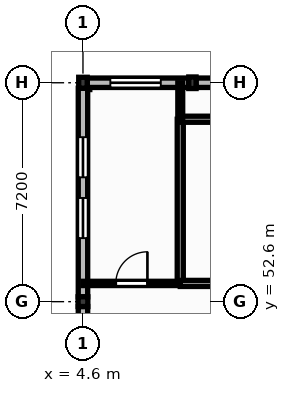
"""IFC4 building model, lengths in metres.
Left out: names, types, materials, properties, quantities, classifications, styles, units other than length and angle.
Written with IfcOpenShell. Run it as: python <this file> out.ifc"""

import sys

from ifc_helpers import new_model, si_unit, direction, frame, frame_2d, origin, origin_2d, place, context, subcontext, project, spatial, rectangle, extrude, element, fill, save


model = new_model("IFC4")
c1 = context("Model", 3, precision=1e-05, world=origin(), true_north=direction((0.0, 1.0)))
c2 = subcontext(c1, "Body", "Model", "MODEL_VIEW")
j1 = project(units=[si_unit("LENGTHUNIT", "METRE"), si_unit("PLANEANGLEUNIT", "RADIAN")], contexts=[c1])
p1 = place(None, origin())
s1 = spatial("IfcSite", under=j1, at=p1, CompositionType="ELEMENT")
p2 = place(p1, origin())
s2 = spatial("IfcBuilding", under=s1, at=p2, CompositionType="ELEMENT")
p3 = place(p2, frame((0.0, 0.0, 9.0)))
s3 = spatial("IfcBuildingStorey", under=s2, at=p3, CompositionType="ELEMENT", Elevation=9.0)
p4 = place(p3, frame((4.6, 52.6, 0.0), z_axis=(0.0, 0.0, 1.0), x_axis=(1.0, 0.0, 0.0)))
e1 = element("IfcColumn", 1, at=p4, inside=s3, PredefinedType="COLUMN", context=c2, shape_type="SweptSolid", body=[
    extrude(rectangle(XDim=0.32, YDim=0.32, at=origin_2d()), origin(), (0.0, 0.0, 1.0), 3.99),
])
p5 = place(p3, frame((4.6, 59.8, 0.0), z_axis=(0.0, 0.0, 1.0), x_axis=(1.0, 0.0, 0.0)))
e2 = element("IfcColumn", 2, at=p5, inside=s3, PredefinedType="COLUMN", context=c2, shape_type="SweptSolid", body=[
    extrude(rectangle(XDim=0.28, YDim=0.36, at=origin_2d()), origin(), (0.0, 0.0, 1.0), 3.99),
])
p6 = place(p3, frame((8.2, 59.8, 0.0), z_axis=(0.0, 0.0, 1.0), x_axis=(1.0, 0.0, 0.0)))
e3 = element("IfcColumn", 3, at=p6, inside=s3, PredefinedType="PILASTER", context=c2, shape_type="SweptSolid", body=[
    extrude(rectangle(XDim=0.24, YDim=0.38, at=origin_2d()), origin(), (0.0, 0.0, 1.0), 3.99),
])
p7 = place(p3, frame((4.6, 45.58, 0.0), z_axis=(0.0, 0.0, 1.0), x_axis=(0.0, 1.0, 0.0)))
e4 = element("IfcWall", 4, at=p7, inside=s3, PredefinedType="SOLIDWALL", context=c2, shape_type="SweptSolid", body=[
    extrude(rectangle(XDim=6.86, YDim=0.31, at=frame_2d((3.43, 0.0))), origin(), (0.0, 0.0, 1.0), 3.53),
])
p8 = place(p7, frame((1.59, 0.0, 1.05)))
e5 = element("IfcOpeningElement", 5, at=p8, cuts=e4, PredefinedType="OPENING", context=c2, shape_type="SweptSolid", body=[
    extrude(rectangle(XDim=1.96, YDim=1.65, at=frame_2d((0.98, 0.825))), frame((0.0, 0.165, 0.0), z_axis=(0.0, -1.0, 0.0), x_axis=(1.0, 0.0, 0.0)), (0.0, 0.0, 1.0), 0.33),
])
p9 = place(p3, frame((4.74, 59.8, 0.0), z_axis=(0.0, 0.0, 1.0), x_axis=(1.0, 0.0, 0.0)))
e6 = element("IfcWall", 6, at=p9, inside=s3, PredefinedType="SOLIDWALL", context=c2, shape_type="SweptSolid", body=[
    extrude(rectangle(XDim=3.34, YDim=0.31, at=frame_2d((1.67, 0.0))), origin(), (0.0, 0.0, 1.0), 3.53),
])
p10 = place(p9, frame((0.76, 0.0, 1.0)))
e7 = element("IfcOpeningElement", 7, at=p10, cuts=e6, PredefinedType="OPENING", context=c2, shape_type="SweptSolid", body=[
    extrude(rectangle(XDim=1.66, YDim=1.8, at=frame_2d((0.83, 0.9))), frame((0.0, 0.165, 0.0), z_axis=(0.0, -1.0, 0.0), x_axis=(1.0, 0.0, 0.0)), (0.0, 0.0, 1.0), 0.33),
])
p11 = place(p3, frame((8.32, 59.8, 0.0), z_axis=(0.0, 0.0, 1.0), x_axis=(1.0, 0.0, 0.0)))
e8 = element("IfcWall", 8, at=p11, inside=s3, PredefinedType="SOLIDWALL", context=c2, shape_type="SweptSolid", body=[
    extrude(rectangle(XDim=3.32, YDim=0.31, at=frame_2d((1.66, 0.0))), origin(), (0.0, 0.0, 1.0), 3.53),
])
p12 = place(p11, frame((1.12, 0.0, 1.0)))
e9 = element("IfcOpeningElement", 9, at=p12, cuts=e8, PredefinedType="OPENING", context=c2, shape_type="SweptSolid", body=[
    extrude(rectangle(XDim=1.08, YDim=1.95, at=frame_2d((0.54, 0.975))), frame((0.0, 0.165, 0.0), z_axis=(0.0, -1.0, 0.0), x_axis=(1.0, 0.0, 0.0)), (0.0, 0.0, 1.0), 0.33),
])
p13 = place(p3, frame((4.6, 52.76, 0.0), z_axis=(0.0, 0.0, 1.0), x_axis=(0.0, 1.0, 0.0)))
e10 = element("IfcWall", 10, at=p13, inside=s3, PredefinedType="SOLIDWALL", context=c2, shape_type="SweptSolid", body=[
    extrude(rectangle(XDim=6.86, YDim=0.31, at=frame_2d((3.43, 0.0))), origin(), (0.0, 0.0, 1.0), 3.53),
])
p14 = place(p13, frame((1.93, 0.0, 1.5)))
e11 = element("IfcOpeningElement", 11, at=p14, cuts=e10, PredefinedType="OPENING", context=c2, shape_type="SweptSolid", body=[
    extrude(rectangle(XDim=1.32, YDim=1.25, at=frame_2d((0.66, 0.625))), frame((0.0, 0.165, 0.0), z_axis=(0.0, -1.0, 0.0), x_axis=(1.0, 0.0, 0.0)), (0.0, 0.0, 1.0), 0.33),
])
p15 = place(p13, frame((3.93, 0.0, 1.5)))
e12 = element("IfcOpeningElement", 12, at=p15, cuts=e10, PredefinedType="OPENING", context=c2, shape_type="SweptSolid", body=[
    extrude(rectangle(XDim=1.32, YDim=1.25, at=frame_2d((0.66, 0.625))), frame((0.0, 0.165, 0.0), z_axis=(0.0, -1.0, 0.0), x_axis=(1.0, 0.0, 0.0)), (0.0, 0.0, 1.0), 0.33),
])
p16 = place(p3, frame((4.6, 53.2, 0.0), z_axis=(0.0, 0.0, 1.0), x_axis=(1.0, 0.0, 0.0)))
e13 = element("IfcWall", 13, at=p16, inside=s3, PredefinedType="PARTITIONING", context=c2, shape_type="SweptSolid", body=[
    extrude(rectangle(XDim=3.2, YDim=0.14, at=frame_2d((1.6, 0.0))), origin(), (0.0, 0.0, 1.0), 3.96),
])
p17 = place(p16, frame((1.08, 0.0, 0.0)))
e14 = element("IfcOpeningElement", 14, at=p17, cuts=e13, PredefinedType="OPENING", context=c2, shape_type="SweptSolid", body=[
    extrude(rectangle(XDim=1.04, YDim=2.1, at=frame_2d((0.52, 1.05))), frame((0.0, 0.08, 0.0), z_axis=(0.0, -1.0, 0.0), x_axis=(1.0, 0.0, 0.0)), (0.0, 0.0, 1.0), 0.16),
])
p18 = place(p3, frame((7.8, 53.27, 0.0), z_axis=(0.0, 0.0, 1.0), x_axis=(0.0, 1.0, 0.0)))
e15 = element("IfcWall", 15, at=p18, inside=s3, PredefinedType="PARTITIONING", context=c2, shape_type="SweptSolid", body=[
    extrude(rectangle(XDim=5.33, YDim=0.2, at=frame_2d((2.665, 0.0))), origin(), (0.0, 0.0, 1.0), 3.96),
])
p19 = place(p3, frame((7.8, 53.2, 0.0), z_axis=(0.0, 0.0, 1.0), x_axis=(1.0, 0.0, 0.0)))
e16 = element("IfcWall", 16, at=p19, inside=s3, PredefinedType="PARTITIONING", context=c2, shape_type="SweptSolid", body=[
    extrude(rectangle(XDim=4.29, YDim=0.2, at=frame_2d((2.145, 0.0))), origin(), (0.0, 0.0, 1.0), 3.96),
])
p20 = place(p19, frame((1.405, 0.0, 0.0)))
e17 = element("IfcOpeningElement", 17, at=p20, cuts=e16, PredefinedType="OPENING", context=c2, shape_type="SweptSolid", body=[
    extrude(rectangle(XDim=1.48, YDim=2.25, at=frame_2d((0.74, 1.125))), frame((0.0, 0.11, 0.0), z_axis=(0.0, -1.0, 0.0), x_axis=(1.0, 0.0, 0.0)), (0.0, 0.0, 1.0), 0.22),
])
p21 = place(p3, frame((12.06, 58.6, 0.0), z_axis=(0.0, 0.0, 1.0), x_axis=(-1.0, 0.0, 0.0)))
e18 = element("IfcWall", 18, at=p21, inside=s3, PredefinedType="PARTITIONING", context=c2, shape_type="SweptSolid", body=[
    extrude(rectangle(XDim=4.26, YDim=0.2, at=frame_2d((2.13, 0.0))), origin(), (0.0, 0.0, 1.0), 3.96),
])
p22 = place(p3, frame((7.8, 58.6, 0.0), z_axis=(0.0, 0.0, 1.0), x_axis=(0.0, 1.0, 0.0)))
e19 = element("IfcWall", 19, at=p22, inside=s3, PredefinedType="PARTITIONING", context=c2, shape_type="SweptSolid", body=[
    extrude(rectangle(XDim=1.2, YDim=0.16, at=frame_2d((0.6, 0.0))), origin(), (0.0, 0.0, 1.0), 3.96),
])
p23 = place(p10, origin())
e20 = element("IfcWindow", 20, at=p23, inside=s3, PartitioningType="DOUBLE_PANEL_VERTICAL", PredefinedType="WINDOW", context=c2, shape_type="SweptSolid", body=[
    extrude(rectangle(XDim=1.66, YDim=1.8, at=frame_2d((0.83, 0.9))), frame((0.0, 0.03, 0.0), z_axis=(0.0, -1.0, 0.0), x_axis=(1.0, 0.0, 0.0)), (0.0, 0.0, 1.0), 0.06),
])
fill(e7, e20)
p24 = place(p14, origin())
e21 = element("IfcWindow", 21, at=p24, inside=s3, PartitioningType="SINGLE_PANEL", PredefinedType="WINDOW", context=c2, shape_type="SweptSolid", body=[
    extrude(rectangle(XDim=1.32, YDim=1.25, at=frame_2d((0.66, 0.625))), frame((0.0, 0.03, 0.0), z_axis=(0.0, -1.0, 0.0), x_axis=(1.0, 0.0, 0.0)), (0.0, 0.0, 1.0), 0.06),
])
fill(e11, e21)
p25 = place(p15, origin())
e22 = element("IfcWindow", 22, at=p25, inside=s3, PartitioningType="SINGLE_PANEL", PredefinedType="WINDOW", context=c2, shape_type="SweptSolid", body=[
    extrude(rectangle(XDim=1.32, YDim=1.25, at=frame_2d((0.66, 0.625))), frame((0.0, 0.03, 0.0), z_axis=(0.0, -1.0, 0.0), x_axis=(1.0, 0.0, 0.0)), (0.0, 0.0, 1.0), 0.06),
])
fill(e12, e22)
p26 = place(p17, origin())
e23 = element("IfcDoor", 23, at=p26, inside=s3, OperationType="SINGLE_SWING_RIGHT", PredefinedType="DOOR", context=c2, shape_type="SweptSolid", body=[
    extrude(rectangle(XDim=1.04, YDim=2.1, at=frame_2d((0.52, 1.05))), frame((0.0, 0.025, 0.0), z_axis=(0.0, -1.0, 0.0), x_axis=(1.0, 0.0, 0.0)), (0.0, 0.0, 1.0), 0.05),
])
fill(e14, e23)
save(model, sys.argv[1])
